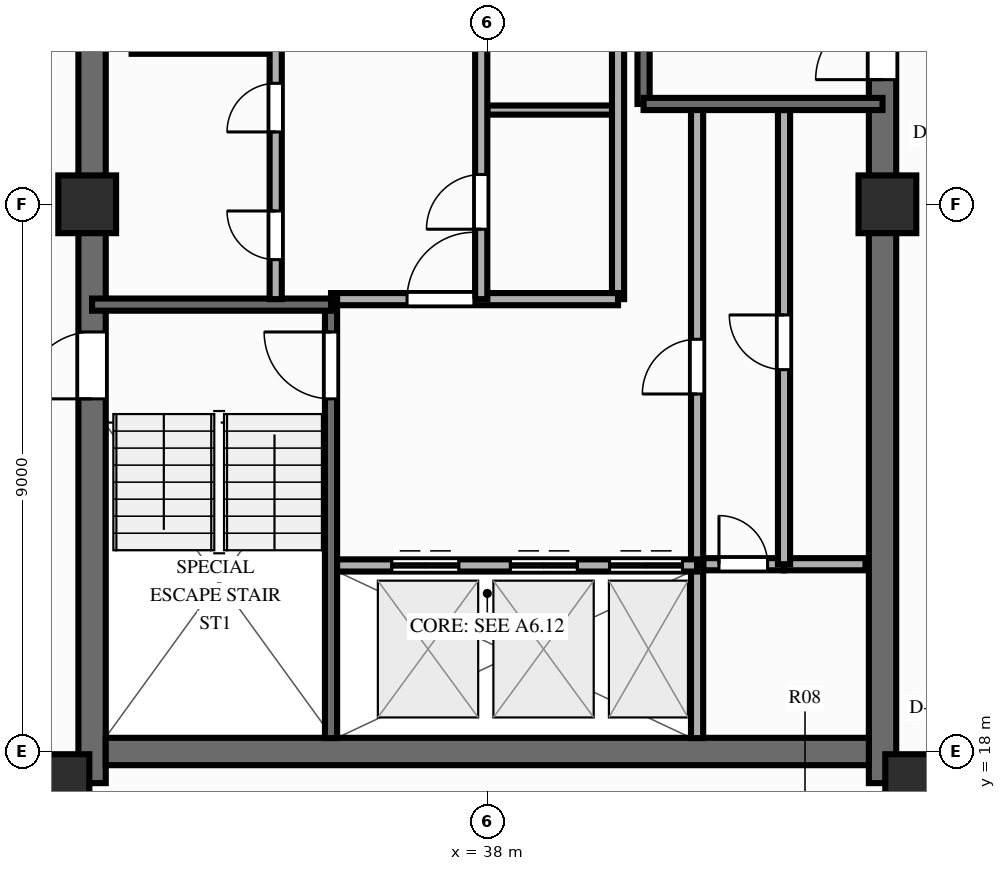
"""IFC4 building model, lengths in metres.
Left out: names, types, materials, properties, quantities, classifications, styles, units other than length and angle.
Written with IfcOpenShell. Run it as: python <this file> out.ifc"""

import sys

from ifc_helpers import new_model, si_unit, direction, frame, frame_2d, origin, origin_2d, place, context, subcontext, project, spatial, rectangle, extrude, source, transform, mapped, element, fill, save


model = new_model("IFC4")
c1 = context("Model", 3, precision=1e-05, world=origin(), true_north=direction((0.0, 1.0)))
c2 = subcontext(c1, "Body", "Model", "MODEL_VIEW")
j1 = project(units=[si_unit("LENGTHUNIT", "METRE"), si_unit("PLANEANGLEUNIT", "RADIAN")], contexts=[c1])
p1 = place(None, origin())
s1 = spatial("IfcSite", under=j1, at=p1, CompositionType="ELEMENT")
p2 = place(p1, origin())
s2 = spatial("IfcBuilding", under=s1, at=p2, CompositionType="ELEMENT")
p3 = place(p2, frame((0.0, 0.0, 240.0)))
s3 = spatial("IfcBuildingStorey", under=s2, at=p3, CompositionType="ELEMENT", Elevation=240.0)
p4 = place(p3, frame((31.5, 17.48, 0.0), z_axis=(0.0, 0.0, 1.0), x_axis=(0.0, 1.0, 0.0)))
e1 = element("IfcWall", 1, at=p4, inside=s3, PredefinedType="SHEAR", context=c2, shape_type="SweptSolid", body=[
    extrude(rectangle(XDim=19.04, YDim=0.45, at=frame_2d((9.52, 0.0))), origin(), (0.0, 0.0, 1.0), 3.0),
])
p5 = place(p4, frame((6.32, 0.0, 0.0)))
e2 = element("IfcOpeningElement", 2, at=p5, cuts=e1, PredefinedType="OPENING", context=c2, shape_type="SweptSolid", body=[
    extrude(rectangle(XDim=1.1, YDim=2.15, at=frame_2d((0.55, 1.075))), frame((0.0, 0.237, 0.0), z_axis=(0.0, -1.0, 0.0), x_axis=(1.0, 0.0, 0.0)), (0.0, 0.0, 1.0), 0.474),
])
p6 = place(p3, frame((44.5, 17.48, 0.0), z_axis=(0.0, 0.0, 1.0), x_axis=(0.0, 1.0, 0.0)))
e3 = element("IfcWall", 3, at=p6, inside=s3, PredefinedType="SHEAR", context=c2, shape_type="SweptSolid", body=[
    extrude(rectangle(XDim=19.04, YDim=0.45, at=frame_2d((9.52, 0.0))), origin(), (0.0, 0.0, 1.0), 3.0),
])
p7 = place(p6, frame((12.67, 0.0, 0.0), z_axis=(0.0, 0.0, 1.0), x_axis=(-1.0, 0.0, 0.0)))
e4 = element("IfcOpeningElement", 4, at=p7, cuts=e3, PredefinedType="OPENING", context=c2, shape_type="SweptSolid", body=[
    extrude(rectangle(XDim=1.1, YDim=2.15, at=frame_2d((0.55, 1.075))), frame((0.0, 0.237, 0.0), z_axis=(0.0, -1.0, 0.0), x_axis=(1.0, 0.0, 0.0)), (0.0, 0.0, 1.0), 0.474),
])
p8 = place(p3, frame((31.725, 18.0, 0.0), z_axis=(0.0, 0.0, 1.0), x_axis=(1.0, 0.0, 0.0)))
e5 = element("IfcWall", 5, at=p8, inside=s3, PredefinedType="SHEAR", context=c2, shape_type="SweptSolid", body=[
    extrude(rectangle(XDim=12.55, YDim=0.45, at=frame_2d((6.275, 0.0))), origin(), (0.0, 0.0, 1.0), 3.0),
])
m1 = source(origin(), c2, "Body", "SweptSolid", [
    extrude(rectangle(XDim=0.95, YDim=0.95, at=origin_2d()), origin(), (0.0, 0.0, 1.0), 3.0),
])
for number, where, z_axis, x_axis in (
    (6, (30.98, 17.48, 0.0), (0.0, 0.0, 1.0), (1.0, 0.0, 0.0)),
    (7, (45.02, 17.48, 0.0), (0.0, 0.0, 1.0), (1.0, 0.0, 0.0)),
    (8, (31.42, 27.0, 0.0), (0.0, 0.0, 1.0), (1.0, 0.0, 0.0)),
    (9, (44.58, 27.0, 0.0), (0.0, 0.0, 1.0), (1.0, 0.0, 0.0)),
):
    element("IfcColumn", number, at=place(p3, frame(where, z_axis=z_axis, x_axis=x_axis)), inside=s3, PredefinedType="COLUMN", context=c2, shape_type="MappedRepresentation", body=[
        mapped(m1, transform((0.0, 0.0, 0.0), scale=1.0)),
    ])
p9 = place(p3, frame((32.15, 29.55, 0.0), z_axis=(0.0, 0.0, 1.0), x_axis=(1.0, 0.0, 0.0)))
e10 = element("IfcWall", 10, at=p9, inside=s3, PredefinedType="PARTITIONING", context=c2, shape_type="SweptSolid", body=[
    extrude(rectangle(XDim=2.27, YDim=0.15, at=frame_2d((1.135, 0.0))), origin(), (0.0, 0.0, 1.0), 2.79),
])
p10 = place(p3, frame((38.0, 28.55, 0.0), z_axis=(0.0, 0.0, 1.0), x_axis=(1.0, 0.0, 0.0)))
e11 = element("IfcWall", 11, at=p10, inside=s3, PredefinedType="PARTITIONING", context=c2, shape_type="SweptSolid", body=[
    extrude(rectangle(XDim=2.2, YDim=0.15, at=frame_2d((1.1, 0.0))), origin(), (0.0, 0.0, 1.0), 2.14),
])
p11 = place(p3, frame((41.55, 21.08, 0.0), z_axis=(0.0, 0.0, 1.0), x_axis=(1.0, 0.0, 0.0)))
e12 = element("IfcWall", 12, at=p11, inside=s3, PredefinedType="PARTITIONING", context=c2, shape_type="SweptSolid", body=[
    extrude(rectangle(XDim=1.33, YDim=0.2, at=frame_2d((0.665, 0.0))), origin(), (0.0, 0.0, 1.0), 2.79),
])
p12 = place(p11, frame((0.26, 0.0, 0.0)))
e13 = element("IfcOpeningElement", 13, at=p12, cuts=e12, PredefinedType="OPENING", context=c2, shape_type="SweptSolid", body=[
    extrude(rectangle(XDim=0.8, YDim=2.05, at=frame_2d((0.4, 1.025))), frame((0.0, 0.112, 0.0), z_axis=(0.0, -1.0, 0.0), x_axis=(1.0, 0.0, 0.0)), (0.0, 0.0, 1.0), 0.224),
])
p13 = place(p3, frame((42.88, 21.08, 0.0), z_axis=(0.0, 0.0, 1.0), x_axis=(1.0, 0.0, 0.0)))
e14 = element("IfcWall", 14, at=p13, inside=s3, PredefinedType="PARTITIONING", context=c2, shape_type="SweptSolid", body=[
    extrude(rectangle(XDim=1.34, YDim=0.2, at=frame_2d((0.67, 0.0))), origin(), (0.0, 0.0, 1.0), 2.79),
])
p14 = place(p3, frame((42.88, 21.08, 0.0), z_axis=(0.0, 0.0, 1.0), x_axis=(0.0, 1.0, 0.0)))
e15 = element("IfcWall", 15, at=p14, inside=s3, PredefinedType="PARTITIONING", context=c2, shape_type="SweptSolid", body=[
    extrude(rectangle(XDim=7.47, YDim=0.2, at=frame_2d((3.735, 0.0))), origin(), (0.0, 0.0, 1.0), 2.79),
])
p15 = place(p14, frame((3.2, 0.0, 0.0)))
e16 = element("IfcOpeningElement", 16, at=p15, cuts=e15, PredefinedType="OPENING", context=c2, shape_type="SweptSolid", body=[
    extrude(rectangle(XDim=0.9, YDim=2.1, at=frame_2d((0.45, 1.05))), frame((0.0, 0.112, 0.0), z_axis=(0.0, -1.0, 0.0), x_axis=(1.0, 0.0, 0.0)), (0.0, 0.0, 1.0), 0.224),
])
p16 = place(p3, frame((41.45, 18.22, 0.0), z_axis=(0.0, 0.0, 1.0), x_axis=(0.0, 1.0, 0.0)))
e17 = element("IfcWall", 17, at=p16, inside=s3, PredefinedType="PARTITIONING", context=c2, shape_type="SweptSolid", body=[
    extrude(rectangle(XDim=2.86, YDim=0.2, at=frame_2d((1.43, 0.0))), origin(), (0.0, 0.0, 1.0), 2.79),
])
p17 = place(p3, frame((41.45, 21.08, 0.0), z_axis=(0.0, 0.0, 1.0), x_axis=(0.0, 1.0, 0.0)))
e18 = element("IfcWall", 18, at=p17, inside=s3, PredefinedType="PARTITIONING", context=c2, shape_type="SweptSolid", body=[
    extrude(rectangle(XDim=7.52, YDim=0.2, at=frame_2d((3.76, 0.0))), origin(), (0.0, 0.0, 1.0), 2.79),
])
p18 = place(p17, frame((2.8, 0.0, 0.0)))
e19 = element("IfcOpeningElement", 19, at=p18, cuts=e18, PredefinedType="OPENING", context=c2, shape_type="SweptSolid", body=[
    extrude(rectangle(XDim=0.9, YDim=2.1, at=frame_2d((0.45, 1.05))), frame((0.0, 0.112, 0.0), z_axis=(0.0, -1.0, 0.0), x_axis=(1.0, 0.0, 0.0)), (0.0, 0.0, 1.0), 0.224),
])
p19 = place(p3, frame((40.15, 25.44, 0.0), z_axis=(0.0, 0.0, 1.0), x_axis=(0.0, 1.0, 0.0)))
e20 = element("IfcWall", 20, at=p19, inside=s3, PredefinedType="PARTITIONING", context=c2, shape_type="SweptSolid", body=[
    extrude(rectangle(XDim=6.36, YDim=0.2, at=frame_2d((3.18, 0.0))), origin(), (0.0, 0.0, 1.0), 2.79),
])
p20 = place(p3, frame((35.43, 21.06, 0.0), z_axis=(0.0, 0.0, 1.0), x_axis=(1.0, 0.0, 0.0)))
e21 = element("IfcWall", 21, at=p20, inside=s3, PredefinedType="PARTITIONING", context=c2, shape_type="SweptSolid", body=[
    extrude(rectangle(XDim=6.02, YDim=0.2, at=frame_2d((3.01, 0.0))), origin(), (0.0, 0.0, 1.0), 2.79),
])
p21 = place(p20, frame((1.0, 0.0, 0.0)))
e22 = element("IfcOpeningElement", 22, at=p21, cuts=e21, PredefinedType="OPENING", context=c2, shape_type="SweptSolid", body=[
    extrude(rectangle(XDim=1.1, YDim=2.15, at=frame_2d((0.55, 1.075))), frame((0.0, 0.112, 0.0), z_axis=(0.0, -1.0, 0.0), x_axis=(1.0, 0.0, 0.0)), (0.0, 0.0, 1.0), 0.224),
])
p22 = place(p20, frame((2.95, 0.0, 0.0)))
e23 = element("IfcOpeningElement", 23, at=p22, cuts=e21, PredefinedType="OPENING", context=c2, shape_type="SweptSolid", body=[
    extrude(rectangle(XDim=1.1, YDim=2.15, at=frame_2d((0.55, 1.075))), frame((0.0, 0.112, 0.0), z_axis=(0.0, -1.0, 0.0), x_axis=(1.0, 0.0, 0.0)), (0.0, 0.0, 1.0), 0.224),
])
p23 = place(p20, frame((4.58, 0.0, 0.0)))
e24 = element("IfcOpeningElement", 24, at=p23, cuts=e21, PredefinedType="OPENING", context=c2, shape_type="SweptSolid", body=[
    extrude(rectangle(XDim=1.2, YDim=2.15, at=frame_2d((0.6, 1.075))), frame((0.0, 0.112, 0.0), z_axis=(0.0, -1.0, 0.0), x_axis=(1.0, 0.0, 0.0)), (0.0, 0.0, 1.0), 0.224),
])
p24 = place(p3, frame((35.43, 25.44, 0.0), z_axis=(0.0, 0.0, 1.0), x_axis=(1.0, 0.0, 0.0)))
e25 = element("IfcWall", 25, at=p24, inside=s3, PredefinedType="PARTITIONING", context=c2, shape_type="SweptSolid", body=[
    extrude(rectangle(XDim=4.72, YDim=0.2, at=frame_2d((2.36, 0.0))), origin(), (0.0, 0.0, 1.0), 2.79),
])
p25 = place(p24, frame((1.25, 0.0, 0.0)))
e26 = element("IfcOpeningElement", 26, at=p25, cuts=e25, PredefinedType="OPENING", context=c2, shape_type="SweptSolid", body=[
    extrude(rectangle(XDim=1.1, YDim=2.15, at=frame_2d((0.55, 1.075))), frame((0.0, 0.112, 0.0), z_axis=(0.0, -1.0, 0.0), x_axis=(1.0, 0.0, 0.0)), (0.0, 0.0, 1.0), 0.224),
])
p26 = place(p3, frame((35.43, 18.22, 0.0), z_axis=(0.0, 0.0, 1.0), x_axis=(0.0, 1.0, 0.0)))
e27 = element("IfcWall", 27, at=p26, inside=s3, PredefinedType="SOLIDWALL", context=c2, shape_type="SweptSolid", body=[
    extrude(rectangle(XDim=7.22, YDim=0.2, at=frame_2d((3.61, 0.0))), origin(), (0.0, 0.0, 1.0), 2.79),
])
p27 = place(p26, frame((6.68, 0.0, 0.0), z_axis=(0.0, 0.0, 1.0), x_axis=(-1.0, 0.0, 0.0)))
e28 = element("IfcOpeningElement", 28, at=p27, cuts=e27, PredefinedType="OPENING", context=c2, shape_type="SweptSolid", body=[
    extrude(rectangle(XDim=1.1, YDim=2.15, at=frame_2d((0.55, 1.075))), frame((0.0, 0.112, 0.0), z_axis=(0.0, -1.0, 0.0), x_axis=(1.0, 0.0, 0.0)), (0.0, 0.0, 1.0), 0.224),
])
p28 = place(p3, frame((31.5, 25.35, 0.0), z_axis=(0.0, 0.0, 1.0), x_axis=(1.0, 0.0, 0.0)))
e29 = element("IfcWall", 29, at=p28, inside=s3, PredefinedType="SOLIDWALL", context=c2, shape_type="SweptSolid", body=[
    extrude(rectangle(XDim=3.93, YDim=0.2, at=frame_2d((1.965, 0.0))), origin(), (0.0, 0.0, 1.0), 2.79),
])
p29 = place(p3, frame((40.57, 28.65, 0.0), z_axis=(0.0, 0.0, 1.0), x_axis=(0.0, 1.0, 0.0)))
e30 = element("IfcWall", 30, at=p29, inside=s3, PredefinedType="SOLIDWALL", context=c2, shape_type="SweptSolid", body=[
    extrude(rectangle(XDim=7.05, YDim=0.2, at=frame_2d((3.525, 0.0))), origin(), (0.0, 0.0, 1.0), 2.79),
])
p30 = place(p3, frame((40.57, 28.65, 0.0), z_axis=(0.0, 0.0, 1.0), x_axis=(1.0, 0.0, 0.0)))
e31 = element("IfcWall", 31, at=p30, inside=s3, PredefinedType="SOLIDWALL", context=c2, shape_type="SweptSolid", body=[
    extrude(rectangle(XDim=3.93, YDim=0.2, at=frame_2d((1.965, 0.0))), origin(), (0.0, 0.0, 1.0), 2.79),
])
p31 = place(p3, frame((34.52, 25.44, 0.0), z_axis=(0.0, 0.0, 1.0), x_axis=(0.0, 1.0, 0.0)))
e32 = element("IfcWall", 32, at=p31, inside=s3, PredefinedType="PARTITIONING", context=c2, shape_type="SweptSolid", body=[
    extrude(rectangle(XDim=10.34, YDim=0.2, at=frame_2d((5.17, 0.0))), origin(), (0.0, 0.0, 1.0), 2.79),
])
p32 = place(p31, frame((0.65, 0.0, 0.0)))
e33 = element("IfcOpeningElement", 33, at=p32, cuts=e32, PredefinedType="OPENING", context=c2, shape_type="SweptSolid", body=[
    extrude(rectangle(XDim=0.8, YDim=2.05, at=frame_2d((0.4, 1.025))), frame((0.0, 0.112, 0.0), z_axis=(0.0, -1.0, 0.0), x_axis=(1.0, 0.0, 0.0)), (0.0, 0.0, 1.0), 0.224),
])
p33 = place(p31, frame((2.75, 0.0, 0.0)))
e34 = element("IfcOpeningElement", 34, at=p33, cuts=e32, PredefinedType="OPENING", context=c2, shape_type="SweptSolid", body=[
    extrude(rectangle(XDim=0.8, YDim=2.05, at=frame_2d((0.4, 1.025))), frame((0.0, 0.112, 0.0), z_axis=(0.0, -1.0, 0.0), x_axis=(1.0, 0.0, 0.0)), (0.0, 0.0, 1.0), 0.224),
])
p34 = place(p31, frame((4.95, 0.0, 0.0)))
e35 = element("IfcOpeningElement", 35, at=p34, cuts=e32, PredefinedType="OPENING", context=c2, shape_type="SweptSolid", body=[
    extrude(rectangle(XDim=0.8, YDim=2.05, at=frame_2d((0.4, 1.025))), frame((0.0, 0.112, 0.0), z_axis=(0.0, -1.0, 0.0), x_axis=(1.0, 0.0, 0.0)), (0.0, 0.0, 1.0), 0.224),
])
p35 = place(p31, frame((7.01, 0.0, 0.0)))
e36 = element("IfcOpeningElement", 36, at=p35, cuts=e32, PredefinedType="OPENING", context=c2, shape_type="SweptSolid", body=[
    extrude(rectangle(XDim=1.0, YDim=2.15, at=frame_2d((0.5, 1.075))), frame((0.0, 0.112, 0.0), z_axis=(0.0, -1.0, 0.0), x_axis=(1.0, 0.0, 0.0)), (0.0, 0.0, 1.0), 0.224),
])
p36 = place(p31, frame((8.76, 0.0, 0.0)))
e37 = element("IfcOpeningElement", 37, at=p36, cuts=e32, PredefinedType="OPENING", context=c2, shape_type="SweptSolid", body=[
    extrude(rectangle(XDim=1.0, YDim=2.15, at=frame_2d((0.5, 1.075))), frame((0.0, 0.112, 0.0), z_axis=(0.0, -1.0, 0.0), x_axis=(1.0, 0.0, 0.0)), (0.0, 0.0, 1.0), 0.224),
])
p37 = place(p3, frame((37.9, 25.44, 0.0), z_axis=(0.0, 0.0, 1.0), x_axis=(0.0, 1.0, 0.0)))
e38 = element("IfcWall", 38, at=p37, inside=s3, PredefinedType="PARTITIONING", context=c2, shape_type="SweptSolid", body=[
    extrude(rectangle(XDim=10.34, YDim=0.2, at=frame_2d((5.17, 0.0))), origin(), (0.0, 0.0, 1.0), 2.79),
])
p38 = place(p37, frame((1.15, 0.0, 0.0)))
e39 = element("IfcOpeningElement", 39, at=p38, cuts=e38, PredefinedType="OPENING", context=c2, shape_type="SweptSolid", body=[
    extrude(rectangle(XDim=0.9, YDim=2.1, at=frame_2d((0.45, 1.05))), frame((0.0, 0.112, 0.0), z_axis=(0.0, -1.0, 0.0), x_axis=(1.0, 0.0, 0.0)), (0.0, 0.0, 1.0), 0.224),
])
p39 = place(p37, frame((4.2, 0.0, 0.0)))
e40 = element("IfcOpeningElement", 40, at=p39, cuts=e38, PredefinedType="OPENING", context=c2, shape_type="SweptSolid", body=[
    extrude(rectangle(XDim=0.9, YDim=2.1, at=frame_2d((0.45, 1.05))), frame((0.0, 0.112, 0.0), z_axis=(0.0, -1.0, 0.0), x_axis=(1.0, 0.0, 0.0)), (0.0, 0.0, 1.0), 0.224),
])
p40 = place(p37, frame((6.86, 0.0, 0.0)))
e41 = element("IfcOpeningElement", 41, at=p40, cuts=e38, PredefinedType="OPENING", context=c2, shape_type="SweptSolid", body=[
    extrude(rectangle(XDim=1.0, YDim=2.15, at=frame_2d((0.5, 1.075))), frame((0.0, 0.112, 0.0), z_axis=(0.0, -1.0, 0.0), x_axis=(1.0, 0.0, 0.0)), (0.0, 0.0, 1.0), 0.224),
])
p41 = place(p37, frame((8.71, 0.0, 0.0)))
e42 = element("IfcOpeningElement", 42, at=p41, cuts=e38, PredefinedType="OPENING", context=c2, shape_type="SweptSolid", body=[
    extrude(rectangle(XDim=1.0, YDim=2.15, at=frame_2d((0.5, 1.075))), frame((0.0, 0.112, 0.0), z_axis=(0.0, -1.0, 0.0), x_axis=(1.0, 0.0, 0.0)), (0.0, 0.0, 1.0), 0.224),
])
m2 = source(origin(), c2, "Body", "SweptSolid", [
    extrude(rectangle(XDim=1.1, YDim=2.15, at=frame_2d((0.55, 1.075))), frame((0.0, 0.025, 0.0), z_axis=(0.0, -1.0, 0.0), x_axis=(1.0, 0.0, 0.0)), (0.0, 0.0, 1.0), 0.05),
])
p42 = place(p5, origin())
e43 = element("IfcDoor", 43, at=p42, inside=s3, OperationType="SINGLE_SWING_LEFT", PredefinedType="DOOR", context=c2, shape_type="MappedRepresentation", body=[
    mapped(m2, transform((0.0, 0.0, 0.0), scale=1.0)),
])
fill(e2, e43)
p43 = place(p7, origin())
e44 = element("IfcDoor", 44, at=p43, inside=s3, OperationType="SINGLE_SWING_RIGHT", PredefinedType="DOOR", context=c2, shape_type="MappedRepresentation", body=[
    mapped(m2, transform((0.0, 0.0, 0.0), scale=1.0)),
])
fill(e4, e44)
m3 = source(origin(), c2, "Body", "SweptSolid", [
    extrude(rectangle(XDim=0.8, YDim=2.05, at=frame_2d((0.4, 1.025))), frame((0.0, 0.025, 0.0), z_axis=(0.0, -1.0, 0.0), x_axis=(1.0, 0.0, 0.0)), (0.0, 0.0, 1.0), 0.05),
])
p44 = place(p12, origin())
e45 = element("IfcDoor", 45, at=p44, inside=s3, OperationType="SINGLE_SWING_LEFT", PredefinedType="DOOR", context=c2, shape_type="MappedRepresentation", body=[
    mapped(m3, transform((0.0, 0.0, 0.0), scale=1.0)),
])
fill(e13, e45)
m4 = source(origin(), c2, "Body", "SweptSolid", [
    extrude(rectangle(XDim=0.9, YDim=2.1, at=frame_2d((0.45, 1.05))), frame((0.0, 0.025, 0.0), z_axis=(0.0, -1.0, 0.0), x_axis=(1.0, 0.0, 0.0)), (0.0, 0.0, 1.0), 0.05),
])
p45 = place(p15, origin())
e46 = element("IfcDoor", 46, at=p45, inside=s3, OperationType="SINGLE_SWING_RIGHT", PredefinedType="DOOR", context=c2, shape_type="MappedRepresentation", body=[
    mapped(m4, transform((0.0, 0.0, 0.0), scale=1.0)),
])
fill(e16, e46)
p46 = place(p18, origin())
e47 = element("IfcDoor", 47, at=p46, inside=s3, OperationType="SINGLE_SWING_LEFT", PredefinedType="DOOR", context=c2, shape_type="MappedRepresentation", body=[
    mapped(m4, transform((0.0, 0.0, 0.0), scale=1.0)),
])
fill(e19, e47)
p47 = place(p21, origin())
e48 = element("IfcDoor", 48, at=p47, inside=s3, OperationType="DOUBLE_DOOR_SLIDING", PredefinedType="DOOR", context=c2, shape_type="MappedRepresentation", body=[
    mapped(m2, transform((0.0, 0.0, 0.0), scale=1.0)),
])
fill(e22, e48)
p48 = place(p22, origin())
e49 = element("IfcDoor", 49, at=p48, inside=s3, OperationType="DOUBLE_DOOR_SLIDING", PredefinedType="DOOR", context=c2, shape_type="MappedRepresentation", body=[
    mapped(m2, transform((0.0, 0.0, 0.0), scale=1.0)),
])
fill(e23, e49)
m5 = source(origin(), c2, "Body", "SweptSolid", [
    extrude(rectangle(XDim=1.2, YDim=2.15, at=frame_2d((0.6, 1.075))), frame((0.0, 0.025, 0.0), z_axis=(0.0, -1.0, 0.0), x_axis=(1.0, 0.0, 0.0)), (0.0, 0.0, 1.0), 0.05),
])
p49 = place(p23, origin())
e50 = element("IfcDoor", 50, at=p49, inside=s3, OperationType="DOUBLE_DOOR_SLIDING", PredefinedType="DOOR", context=c2, shape_type="MappedRepresentation", body=[
    mapped(m5, transform((0.0, 0.0, 0.0), scale=1.0)),
])
fill(e24, e50)
p50 = place(p25, origin())
e51 = element("IfcDoor", 51, at=p50, inside=s3, OperationType="SINGLE_SWING_RIGHT", PredefinedType="DOOR", context=c2, shape_type="MappedRepresentation", body=[
    mapped(m2, transform((0.0, 0.0, 0.0), scale=1.0)),
])
fill(e26, e51)
p51 = place(p27, origin())
e52 = element("IfcDoor", 52, at=p51, inside=s3, OperationType="SINGLE_SWING_LEFT", PredefinedType="DOOR", context=c2, shape_type="MappedRepresentation", body=[
    mapped(m2, transform((0.0, 0.0, 0.0), scale=1.0)),
])
fill(e28, e52)
p52 = place(p32, origin())
e53 = element("IfcDoor", 53, at=p52, inside=s3, OperationType="SINGLE_SWING_RIGHT", PredefinedType="DOOR", context=c2, shape_type="MappedRepresentation", body=[
    mapped(m3, transform((0.0, 0.0, 0.0), scale=1.0)),
])
fill(e33, e53)
p53 = place(p33, origin())
e54 = element("IfcDoor", 54, at=p53, inside=s3, OperationType="SINGLE_SWING_LEFT", PredefinedType="DOOR", context=c2, shape_type="MappedRepresentation", body=[
    mapped(m3, transform((0.0, 0.0, 0.0), scale=1.0)),
])
fill(e34, e54)
p54 = place(p38, origin())
e55 = element("IfcDoor", 55, at=p54, inside=s3, OperationType="SINGLE_SWING_LEFT", PredefinedType="DOOR", context=c2, shape_type="MappedRepresentation", body=[
    mapped(m4, transform((0.0, 0.0, 0.0), scale=1.0)),
])
fill(e39, e55)
save(model, sys.argv[1])
